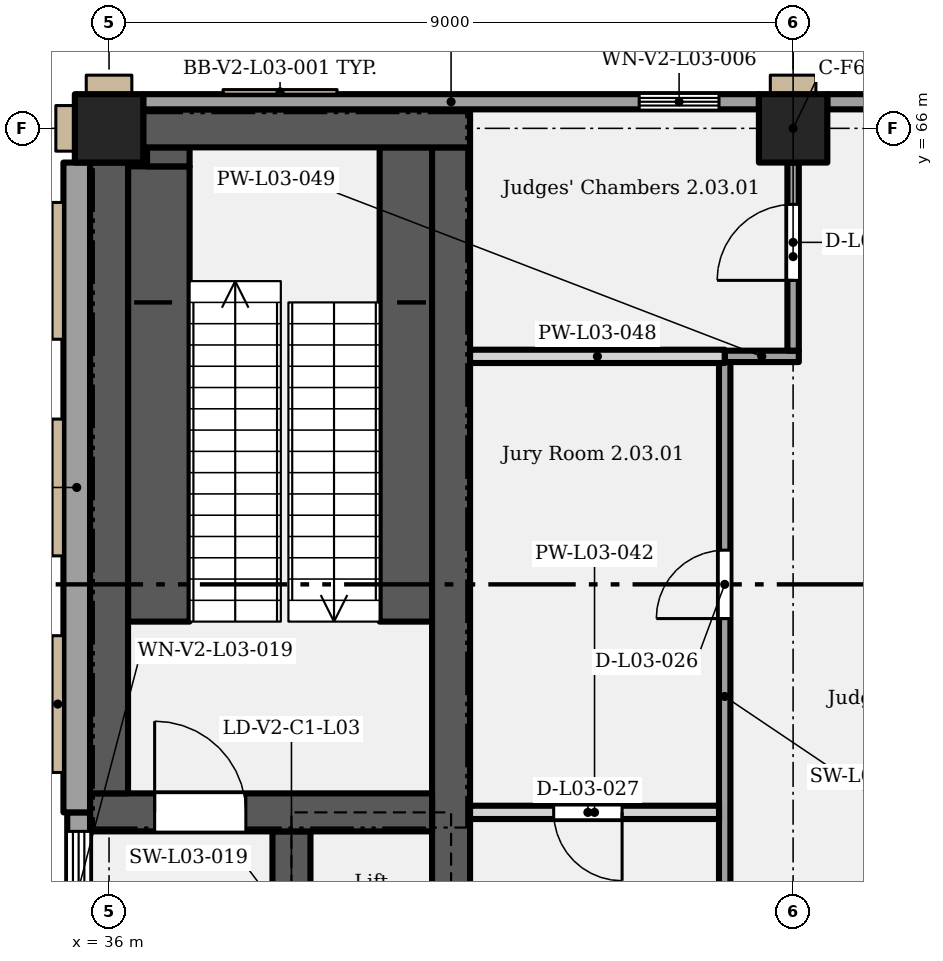
"""IFC4 building model, lengths in metres.
Left out: names, types, materials, properties, quantities, classifications, styles, units other than length and angle.
Written with IfcOpenShell. Run it as: python <this file> out.ifc"""

import sys

from ifc_helpers import new_model, si_unit, direction, frame, frame_2d, origin, origin_2d, place, context, subcontext, project, spatial, rectangle, extrude, element, fill, save


model = new_model("IFC4")
c1 = context("Model", 3, precision=1e-05, world=origin(), true_north=direction((0.0, 1.0)))
c2 = subcontext(c1, "Body", "Model", "MODEL_VIEW")
j1 = project(units=[si_unit("LENGTHUNIT", "METRE"), si_unit("PLANEANGLEUNIT", "RADIAN")], contexts=[c1])
p1 = place(None, origin())
s1 = spatial("IfcSite", under=j1, at=p1, CompositionType="ELEMENT")
p2 = place(p1, origin())
s2 = spatial("IfcBuilding", under=s1, at=p2, CompositionType="ELEMENT")
p3 = place(p2, frame((0.0, 0.0, 17.4)))
s3 = spatial("IfcBuildingStorey", under=s2, at=p3, CompositionType="ELEMENT", Elevation=17.4)
for number, where, z_axis, x_axis in (
    (1, (36.0, 66.0, 0.0), (0.0, 0.0, 1.0), (1.0, 0.0, 0.0)),
    (2, (45.0, 66.0, 0.0), (0.0, 0.0, 1.0), (1.0, 0.0, 0.0)),
):
    element("IfcColumn", number, at=place(p3, frame(where, z_axis=z_axis, x_axis=x_axis)), inside=s3, PredefinedType="COLUMN", context=c2, shape_type="SweptSolid", body=[
        extrude(rectangle(XDim=0.9, YDim=0.9, at=origin_2d()), origin(), (0.0, 0.0, 1.0), 5.4),
    ])
p4 = place(p3, frame((38.4, 54.25, 0.0), z_axis=(0.0, 0.0, 1.0), x_axis=(0.0, 1.0, 0.0)))
e3 = element("IfcWall", 3, at=p4, inside=s3, PredefinedType="SHEAR", context=c2, shape_type="SweptSolid", body=[
    extrude(rectangle(XDim=2.5, YDim=0.5, at=frame_2d((1.25, 0.0))), origin(), (0.0, 0.0, 1.0), 5.15),
])
p5 = place(p4, frame((0.7, 0.0, 0.0)))
e4 = element("IfcOpeningElement", 4, at=p5, cuts=e3, PredefinedType="OPENING", context=c2, shape_type="SweptSolid", body=[
    extrude(rectangle(XDim=1.1, YDim=2.1, at=frame_2d((0.55, 1.05))), frame((0.0, 0.26, 0.0), z_axis=(0.0, -1.0, 0.0), x_axis=(1.0, 0.0, 0.0)), (0.0, 0.0, 1.0), 0.52),
])
p6 = place(p3, frame((40.5, 54.25, 0.0), z_axis=(0.0, 0.0, 1.0), x_axis=(0.0, 1.0, 0.0)))
e5 = element("IfcWall", 5, at=p6, inside=s3, PredefinedType="SHEAR", context=c2, shape_type="SweptSolid", body=[
    extrude(rectangle(XDim=11.5, YDim=0.5, at=frame_2d((5.75, 0.0))), origin(), (0.0, 0.0, 1.0), 5.15),
])
p7 = place(p3, frame((35.75, 57.0, 0.0), z_axis=(0.0, 0.0, 1.0), x_axis=(1.0, 0.0, 0.0)))
e6 = element("IfcWall", 6, at=p7, inside=s3, PredefinedType="SHEAR", context=c2, shape_type="SweptSolid", body=[
    extrude(rectangle(XDim=4.5, YDim=0.5, at=frame_2d((2.25, 0.0))), origin(), (0.0, 0.0, 1.0), 5.15),
])
p8 = place(p7, frame((0.85, 0.0, 0.0)))
e7 = element("IfcOpeningElement", 7, at=p8, cuts=e6, PredefinedType="OPENING", context=c2, shape_type="SweptSolid", body=[
    extrude(rectangle(XDim=1.2, YDim=2.1, at=frame_2d((0.6, 1.05))), frame((0.0, 0.26, 0.0), z_axis=(0.0, -1.0, 0.0), x_axis=(1.0, 0.0, 0.0)), (0.0, 0.0, 1.0), 0.52),
])
p9 = place(p3, frame((36.0, 57.25, 0.0), z_axis=(0.0, 0.0, 1.0), x_axis=(0.0, 1.0, 0.0)))
e8 = element("IfcWall", 8, at=p9, inside=s3, PredefinedType="SHEAR", context=c2, shape_type="SweptSolid", body=[
    extrude(rectangle(XDim=8.3, YDim=0.5, at=frame_2d((4.15, 0.0))), origin(), (0.0, 0.0, 1.0), 5.15),
])
p10 = place(p3, frame((36.45, 66.0, 0.0), z_axis=(0.0, 0.0, 1.0), x_axis=(1.0, 0.0, 0.0)))
e9 = element("IfcWall", 9, at=p10, inside=s3, PredefinedType="SHEAR", context=c2, shape_type="SweptSolid", body=[
    extrude(rectangle(XDim=4.3, YDim=0.5, at=frame_2d((2.15, 0.0))), origin(), (0.0, 0.0, 1.0), 5.15),
])
p11 = place(p3, frame((36.45, 66.35, 0.0), z_axis=(0.0, 0.0, 1.0), x_axis=(1.0, 0.0, 0.0)))
e10 = element("IfcWall", 10, at=p11, inside=s3, PredefinedType="SOLIDWALL", context=c2, shape_type="SweptSolid", body=[
    extrude(rectangle(XDim=8.1, YDim=0.2, at=frame_2d((4.05, 0.0))), origin(), (0.0, 0.0, 1.0), 5.15),
])
p12 = place(p11, frame((6.525, 0.0, 1.05)))
e11 = element("IfcOpeningElement", 11, at=p12, cuts=e10, PredefinedType="OPENING", context=c2, shape_type="SweptSolid", body=[
    extrude(rectangle(XDim=1.05, YDim=2.4, at=frame_2d((0.525, 1.2))), frame((0.0, 0.11, 0.0), z_axis=(0.0, -1.0, 0.0), x_axis=(1.0, 0.0, 0.0)), (0.0, 0.0, 1.0), 0.22),
])
p13 = place(p3, frame((45.45, 66.35, 0.0), z_axis=(0.0, 0.0, 1.0), x_axis=(1.0, 0.0, 0.0)))
e12 = element("IfcWall", 12, at=p13, inside=s3, PredefinedType="SOLIDWALL", context=c2, shape_type="SweptSolid", body=[
    extrude(rectangle(XDim=8.1, YDim=0.2, at=frame_2d((4.05, 0.0))), origin(), (0.0, 0.0, 1.0), 5.15),
])
p14 = place(p13, frame((1.05, 0.0, 1.05)))
e13 = element("IfcOpeningElement", 13, at=p14, cuts=e12, PredefinedType="OPENING", context=c2, shape_type="SweptSolid", body=[
    extrude(rectangle(XDim=1.5, YDim=3.5, at=frame_2d((0.75, 1.75))), frame((0.0, 0.11, 0.0), z_axis=(0.0, -1.0, 0.0), x_axis=(1.0, 0.0, 0.0)), (0.0, 0.0, 1.0), 0.22),
])
p15 = place(p3, frame((35.6, 54.55, 0.0), z_axis=(0.0, 0.0, 1.0), x_axis=(0.0, 1.0, 0.0)))
e14 = element("IfcWall", 14, at=p15, inside=s3, PredefinedType="SOLIDWALL", context=c2, shape_type="SweptSolid", body=[
    extrude(rectangle(XDim=2.45, YDim=0.3, at=frame_2d((1.225, 0.0))), origin(), (0.0, 0.0, 1.0), 5.15),
])
p16 = place(p15, frame((0.7, 0.0, 1.05)))
e15 = element("IfcOpeningElement", 15, at=p16, cuts=e14, PredefinedType="OPENING", context=c2, shape_type="SweptSolid", body=[
    extrude(rectangle(XDim=1.5, YDim=3.5, at=frame_2d((0.75, 1.75))), frame((0.0, 0.16, 0.0), z_axis=(0.0, -1.0, 0.0), x_axis=(1.0, 0.0, 0.0)), (0.0, 0.0, 1.0), 0.32),
])
p17 = place(p3, frame((35.575, 57.0, 0.0), z_axis=(0.0, 0.0, 1.0), x_axis=(0.0, 1.0, 0.0)))
e16 = element("IfcWall", 16, at=p17, inside=s3, PredefinedType="SOLIDWALL", context=c2, shape_type="SweptSolid", body=[
    extrude(rectangle(XDim=8.55, YDim=0.35, at=frame_2d((4.275, 0.0))), origin(), (0.0, 0.0, 1.0), 5.15),
])
p18 = place(p3, frame((40.75, 57.0, 0.0), z_axis=(0.0, 0.0, 1.0), x_axis=(1.0, 0.0, 0.0)))
e17 = element("IfcWall", 17, at=p18, inside=s3, PredefinedType="PARTITIONING", context=c2, shape_type="SweptSolid", body=[
    extrude(rectangle(XDim=3.275, YDim=0.175, at=frame_2d((1.637, 0.0))), origin(), (0.0, 0.0, 1.0), 5.15),
])
p19 = place(p18, frame((2.0, 0.0, 0.0), z_axis=(0.0, 0.0, 1.0), x_axis=(-1.0, 0.0, 0.0)))
e18 = element("IfcOpeningElement", 18, at=p19, cuts=e17, PredefinedType="OPENING", context=c2, shape_type="SweptSolid", body=[
    extrude(rectangle(XDim=0.9, YDim=2.1, at=frame_2d((0.45, 1.05))), frame((0.0, 0.097, 0.0), z_axis=(0.0, -1.0, 0.0), x_axis=(1.0, 0.0, 0.0)), (0.0, 0.0, 1.0), 0.195),
])
p20 = place(p3, frame((40.75, 63.0, 0.0), z_axis=(0.0, 0.0, 1.0), x_axis=(1.0, 0.0, 0.0)))
e19 = element("IfcWall", 19, at=p20, inside=s3, PredefinedType="PARTITIONING", context=c2, shape_type="SweptSolid", body=[
    extrude(rectangle(XDim=3.35, YDim=0.175, at=frame_2d((1.675, 0.0))), origin(), (0.0, 0.0, 1.0), 5.15),
])
p21 = place(p3, frame((44.1, 63.0, 0.0), z_axis=(0.0, 0.0, 1.0), x_axis=(1.0, 0.0, 0.0)))
e20 = element("IfcWall", 20, at=p21, inside=s3, PredefinedType="PARTITIONING", context=c2, shape_type="SweptSolid", body=[
    extrude(rectangle(XDim=0.975, YDim=0.15, at=frame_2d((0.487, 0.0))), origin(), (0.0, 0.0, 1.0), 5.15),
])
p22 = place(p3, frame((44.1, 54.125, 0.0), z_axis=(0.0, 0.0, 1.0), x_axis=(0.0, 1.0, 0.0)))
e21 = element("IfcWall", 21, at=p22, inside=s3, PredefinedType="PARTITIONING", context=c2, shape_type="SweptSolid", body=[
    extrude(rectangle(XDim=8.8, YDim=0.15, at=frame_2d((4.4, 0.0))), origin(), (0.0, 0.0, 1.0), 5.15),
])
p23 = place(p22, frame((0.875, 0.0, 0.0)))
e22 = element("IfcOpeningElement", 22, at=p23, cuts=e21, PredefinedType="OPENING", context=c2, shape_type="SweptSolid", body=[
    extrude(rectangle(XDim=1.0, YDim=2.1, at=frame_2d((0.5, 1.05))), frame((0.0, 0.085, 0.0), z_axis=(0.0, -1.0, 0.0), x_axis=(1.0, 0.0, 0.0)), (0.0, 0.0, 1.0), 0.17),
])
p24 = place(p22, frame((5.425, 0.0, 0.0)))
e23 = element("IfcOpeningElement", 23, at=p24, cuts=e21, PredefinedType="OPENING", context=c2, shape_type="SweptSolid", body=[
    extrude(rectangle(XDim=0.9, YDim=2.1, at=frame_2d((0.45, 1.05))), frame((0.0, 0.085, 0.0), z_axis=(0.0, -1.0, 0.0), x_axis=(1.0, 0.0, 0.0)), (0.0, 0.0, 1.0), 0.17),
])
p25 = place(p3, frame((45.0, 63.075, 0.0), z_axis=(0.0, 0.0, 1.0), x_axis=(0.0, 1.0, 0.0)))
e24 = element("IfcWall", 24, at=p25, inside=s3, PredefinedType="PARTITIONING", context=c2, shape_type="SweptSolid", body=[
    extrude(rectangle(XDim=2.475, YDim=0.15, at=frame_2d((1.238, 0.0))), origin(), (0.0, 0.0, 1.0), 4.4),
])
p26 = place(p25, frame((0.925, 0.0, 0.0)))
e25 = element("IfcOpeningElement", 25, at=p26, cuts=e24, PredefinedType="OPENING", context=c2, shape_type="SweptSolid", body=[
    extrude(rectangle(XDim=1.0, YDim=2.1, at=frame_2d((0.5, 1.05))), frame((0.0, 0.085, 0.0), z_axis=(0.0, -1.0, 0.0), x_axis=(1.0, 0.0, 0.0)), (0.0, 0.0, 1.0), 0.17),
])
p27 = place(p3, frame((36.655, 59.51, 0.0), z_axis=(0.0, 0.0, 1.0), x_axis=(0.0, 1.0, 0.0)))
e26 = element("IfcWall", 26, at=p27, inside=s3, PredefinedType="SHEAR", context=c2, shape_type="SweptSolid", body=[
    extrude(rectangle(XDim=5.99, YDim=0.81, at=frame_2d((2.995, 0.0))), origin(), (0.0, 0.0, 1.0), 2.587),
])
p28 = place(p3, frame((36.78, 65.5, 0.0), z_axis=(0.0, 0.0, 1.0), x_axis=(0.0, 1.0, 0.0)))
e27 = element("IfcWall", 27, at=p28, inside=s3, PredefinedType="SHEAR", context=c2, shape_type="SweptSolid", body=[
    extrude(rectangle(XDim=0.25, YDim=0.56, at=frame_2d((0.125, 0.0))), origin(), (0.0, 0.0, 1.0), 2.587),
])
p29 = place(p3, frame((39.905, 59.51, 0.0), z_axis=(0.0, 0.0, 1.0), x_axis=(0.0, 1.0, 0.0)))
e28 = element("IfcWall", 28, at=p29, inside=s3, PredefinedType="SHEAR", context=c2, shape_type="SweptSolid", body=[
    extrude(rectangle(XDim=6.24, YDim=0.69, at=frame_2d((3.12, 0.0))), origin(), (0.0, 0.0, 1.0), 2.587),
])
p30 = place(p12, origin())
e29 = element("IfcWindow", 29, at=p30, inside=s3, PartitioningType="SINGLE_PANEL", PredefinedType="WINDOW", context=c2, shape_type="SweptSolid", body=[
    extrude(rectangle(XDim=1.05, YDim=2.4, at=frame_2d((0.525, 1.2))), frame((0.0, 0.03, 0.0), z_axis=(0.0, -1.0, 0.0), x_axis=(1.0, 0.0, 0.0)), (0.0, 0.0, 1.0), 0.06),
])
fill(e11, e29)
p31 = place(p16, origin())
e30 = element("IfcWindow", 30, at=p31, inside=s3, PartitioningType="SINGLE_PANEL", PredefinedType="WINDOW", context=c2, shape_type="SweptSolid", body=[
    extrude(rectangle(XDim=1.5, YDim=3.5, at=frame_2d((0.75, 1.75))), frame((0.0, 0.03, 0.0), z_axis=(0.0, -1.0, 0.0), x_axis=(1.0, 0.0, 0.0)), (0.0, 0.0, 1.0), 0.06),
])
fill(e15, e30)
p32 = place(p8, origin())
e31 = element("IfcDoor", 31, at=p32, inside=s3, OperationType="SINGLE_SWING_LEFT", PredefinedType="DOOR", context=c2, shape_type="SweptSolid", body=[
    extrude(rectangle(XDim=1.2, YDim=2.1, at=frame_2d((0.6, 1.05))), frame((0.0, 0.025, 0.0), z_axis=(0.0, -1.0, 0.0), x_axis=(1.0, 0.0, 0.0)), (0.0, 0.0, 1.0), 0.05),
])
fill(e7, e31)
p33 = place(p24, origin())
e32 = element("IfcDoor", 32, at=p33, inside=s3, OperationType="SINGLE_SWING_LEFT", PredefinedType="DOOR", context=c2, shape_type="SweptSolid", body=[
    extrude(rectangle(XDim=0.9, YDim=2.1, at=frame_2d((0.45, 1.05))), frame((0.0, 0.025, 0.0), z_axis=(0.0, -1.0, 0.0), x_axis=(1.0, 0.0, 0.0)), (0.0, 0.0, 1.0), 0.05),
])
fill(e23, e32)
p34 = place(p19, origin())
e33 = element("IfcDoor", 33, at=p34, inside=s3, OperationType="SINGLE_SWING_LEFT", PredefinedType="DOOR", context=c2, shape_type="SweptSolid", body=[
    extrude(rectangle(XDim=0.9, YDim=2.1, at=frame_2d((0.45, 1.05))), frame((0.0, 0.025, 0.0), z_axis=(0.0, -1.0, 0.0), x_axis=(1.0, 0.0, 0.0)), (0.0, 0.0, 1.0), 0.05),
])
fill(e18, e33)
p35 = place(p26, origin())
e34 = element("IfcDoor", 34, at=p35, inside=s3, OperationType="SINGLE_SWING_LEFT", PredefinedType="DOOR", context=c2, shape_type="SweptSolid", body=[
    extrude(rectangle(XDim=1.0, YDim=2.1, at=frame_2d((0.5, 1.05))), frame((0.0, 0.025, 0.0), z_axis=(0.0, -1.0, 0.0), x_axis=(1.0, 0.0, 0.0)), (0.0, 0.0, 1.0), 0.05),
])
fill(e25, e34)
save(model, sys.argv[1])
